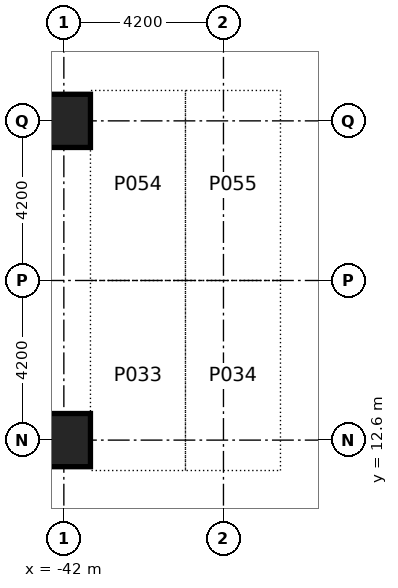
"""IFC4 building model, lengths in metres.
Left out: names, types, materials, properties, quantities, classifications, styles, units other than length and angle.
Written with IfcOpenShell. Run it as: python <this file> out.ifc"""

import sys

from ifc_helpers import new_model, si_unit, direction, frame, origin, origin_2d, place, context, subcontext, project, spatial, rectangle, extrude, element, save


model = new_model("IFC4")
c1 = context("Model", 3, precision=1e-05, world=origin(), true_north=direction((0.0, 1.0)))
c2 = subcontext(c1, "Body", "Model", "MODEL_VIEW")
j1 = project(units=[si_unit("LENGTHUNIT", "METRE"), si_unit("PLANEANGLEUNIT", "RADIAN")], contexts=[c1])
p1 = place(None, origin())
s1 = spatial("IfcSite", under=j1, at=p1, CompositionType="ELEMENT")
p2 = place(p1, origin())
s2 = spatial("IfcBuilding", under=s1, at=p2, CompositionType="ELEMENT")
p3 = place(p2, frame((0.0, 0.0, -4.2)))
s3 = spatial("IfcBuildingStorey", under=s2, at=p3, CompositionType="ELEMENT", Elevation=-4.2)
for number, where, z_axis, x_axis in (
    (1, (-42.0, 12.6, 0.0), (0.0, 0.0, 1.0), (1.0, 0.0, 0.0)),
    (2, (-42.0, 21.0, 0.0), (0.0, 0.0, 1.0), (1.0, 0.0, 0.0)),
):
    element("IfcColumn", number, at=place(p3, frame(where, z_axis=z_axis, x_axis=x_axis)), inside=s3, PredefinedType="COLUMN", context=c2, shape_type="SweptSolid", body=[
        extrude(rectangle(XDim=1.4, YDim=1.4, at=origin_2d()), origin(), (0.0, 0.0, 1.0), 3.75),
    ])
save(model, sys.argv[1])
